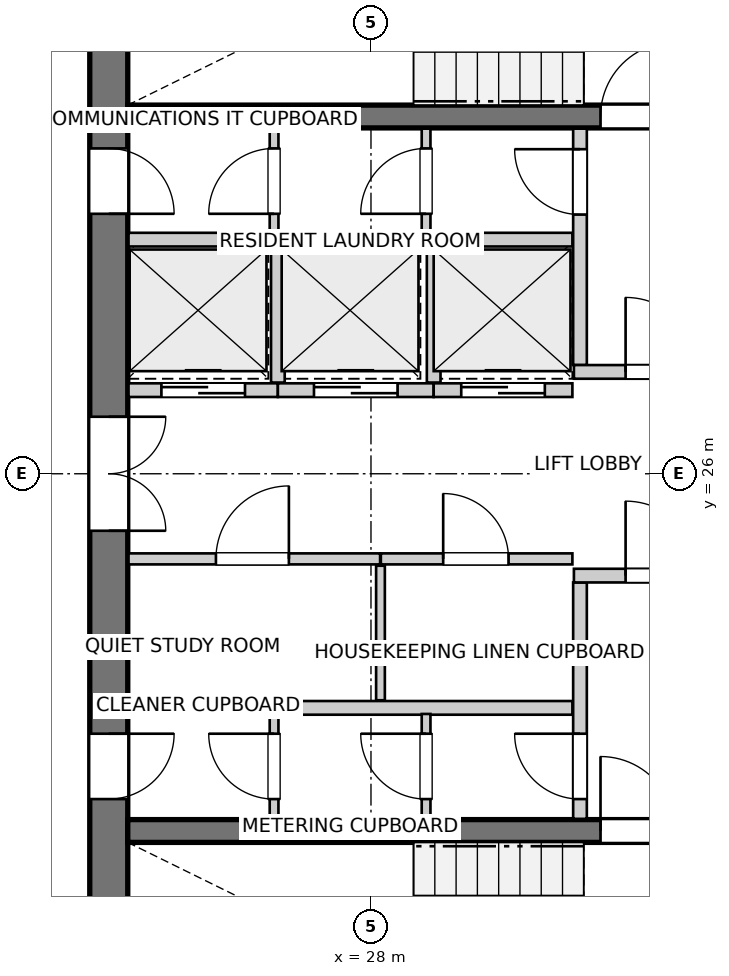
"""IFC4 building model, lengths in metres.
Left out: names, types, materials, properties, quantities, classifications, styles, units other than length and angle.
Written with IfcOpenShell. Run it as: python <this file> out.ifc"""

import sys

from ifc_helpers import new_model, si_unit, direction, frame, frame_2d, origin, place, context, subcontext, project, spatial, rectangle, extrude, source, transform, mapped, element, fill, save


model = new_model("IFC4")
c1 = context("Model", 3, precision=1e-05, world=origin(), true_north=direction((0.0, 1.0)))
c2 = subcontext(c1, "Body", "Model", "MODEL_VIEW")
j1 = project(units=[si_unit("LENGTHUNIT", "METRE"), si_unit("PLANEANGLEUNIT", "RADIAN")], contexts=[c1])
p1 = place(None, origin())
s1 = spatial("IfcSite", under=j1, at=p1, CompositionType="ELEMENT")
p2 = place(p1, origin())
s2 = spatial("IfcBuilding", under=s1, at=p2, CompositionType="ELEMENT")
p3 = place(p2, frame((0.0, 0.0, 250.0)))
s3 = spatial("IfcBuildingStorey", under=s2, at=p3, CompositionType="ELEMENT", Elevation=250.0)
p4 = place(p3, frame((24.55, 33.8, 0.0), z_axis=(0.0, 0.0, 1.0), x_axis=(0.0, -1.0, 0.0)))
e1 = element("IfcWall", 1, at=p4, inside=s3, PredefinedType="SHEAR", context=c2, shape_type="SweptSolid", body=[
    extrude(rectangle(XDim=15.6, YDim=0.5, at=frame_2d((7.8, 0.0))), origin(), (0.0, 0.0, 1.0), 2.95),
])
p5 = place(p4, frame((7.05, 0.0, 0.0)))
e2 = element("IfcOpeningElement", 2, at=p5, cuts=e1, PredefinedType="OPENING", context=c2, shape_type="SweptSolid", body=[
    extrude(rectangle(XDim=1.5, YDim=2.15, at=frame_2d((0.75, 1.075))), frame((0.0, 0.26, 0.0), z_axis=(0.0, -1.0, 0.0), x_axis=(1.0, 0.0, 0.0)), (0.0, 0.0, 1.0), 0.52),
])
p6 = place(p4, frame((3.52, 0.0, 0.0)))
e3 = element("IfcOpeningElement", 3, at=p6, cuts=e1, PredefinedType="OPENING", context=c2, shape_type="SweptSolid", body=[
    extrude(rectangle(XDim=0.86, YDim=2.05, at=frame_2d((0.43, 1.025))), frame((0.0, 0.26, 0.0), z_axis=(0.0, -1.0, 0.0), x_axis=(1.0, 0.0, 0.0)), (0.0, 0.0, 1.0), 0.52),
])
p7 = place(p4, frame((11.22, 0.0, 0.0)))
e4 = element("IfcOpeningElement", 4, at=p7, cuts=e1, PredefinedType="OPENING", context=c2, shape_type="SweptSolid", body=[
    extrude(rectangle(XDim=0.86, YDim=2.05, at=frame_2d((0.43, 1.025))), frame((0.0, 0.26, 0.0), z_axis=(0.0, -1.0, 0.0), x_axis=(1.0, 0.0, 0.0)), (0.0, 0.0, 1.0), 0.52),
])
p8 = place(p3, frame((24.8, 21.3, 0.0), z_axis=(0.0, 0.0, 1.0), x_axis=(1.0, 0.0, 0.0)))
e5 = element("IfcWall", 5, at=p8, inside=s3, PredefinedType="SHEAR", context=c2, shape_type="SweptSolid", body=[
    extrude(rectangle(XDim=11.1, YDim=0.3, at=frame_2d((5.55, 0.0))), origin(), (0.0, 0.0, 1.0), 2.95),
])
p9 = place(p8, frame((6.22, 0.0, 0.0)))
e6 = element("IfcOpeningElement", 6, at=p9, cuts=e5, PredefinedType="OPENING", context=c2, shape_type="SweptSolid", body=[
    extrude(rectangle(XDim=0.98, YDim=2.15, at=frame_2d((0.49, 1.075))), frame((0.0, 0.16, 0.0), z_axis=(0.0, -1.0, 0.0), x_axis=(1.0, 0.0, 0.0)), (0.0, 0.0, 1.0), 0.32),
])
p10 = place(p8, frame((9.15, 0.0, 0.0)))
e7 = element("IfcOpeningElement", 7, at=p10, cuts=e5, PredefinedType="OPENING", context=c2, shape_type="SweptSolid", body=[
    extrude(rectangle(XDim=1.15, YDim=2.15, at=frame_2d((0.575, 1.075))), frame((0.0, 0.16, 0.0), z_axis=(0.0, -1.0, 0.0), x_axis=(1.0, 0.0, 0.0)), (0.0, 0.0, 1.0), 0.32),
])
p11 = place(p3, frame((24.8, 30.7, 0.0), z_axis=(0.0, 0.0, 1.0), x_axis=(1.0, 0.0, 0.0)))
e8 = element("IfcWall", 8, at=p11, inside=s3, PredefinedType="SHEAR", context=c2, shape_type="SweptSolid", body=[
    extrude(rectangle(XDim=11.1, YDim=0.3, at=frame_2d((5.55, 0.0))), origin(), (0.0, 0.0, 1.0), 2.95),
])
p12 = place(p11, frame((6.22, 0.0, 0.0)))
e9 = element("IfcOpeningElement", 9, at=p12, cuts=e8, PredefinedType="OPENING", context=c2, shape_type="SweptSolid", body=[
    extrude(rectangle(XDim=0.98, YDim=2.15, at=frame_2d((0.49, 1.075))), frame((0.0, 0.16, 0.0), z_axis=(0.0, -1.0, 0.0), x_axis=(1.0, 0.0, 0.0)), (0.0, 0.0, 1.0), 0.32),
])
p13 = place(p11, frame((9.15, 0.0, 0.0)))
e10 = element("IfcOpeningElement", 10, at=p13, cuts=e8, PredefinedType="OPENING", context=c2, shape_type="SweptSolid", body=[
    extrude(rectangle(XDim=1.15, YDim=2.15, at=frame_2d((0.575, 1.075))), frame((0.0, 0.16, 0.0), z_axis=(0.0, -1.0, 0.0), x_axis=(1.0, 0.0, 0.0)), (0.0, 0.0, 1.0), 0.32),
])
p14 = place(p3, frame((30.75, 21.46, 0.0), z_axis=(0.0, 0.0, 1.0), x_axis=(0.0, 1.0, 0.0)))
e11 = element("IfcWall", 11, at=p14, inside=s3, PredefinedType="PARTITIONING", context=c2, shape_type="SweptSolid", body=[
    extrude(rectangle(XDim=3.11, YDim=0.18, at=frame_2d((1.555, 0.0))), origin(), (0.0, 0.0, 1.0), 2.95),
])
p15 = place(p14, frame((0.26, 0.0, 0.0)))
e12 = element("IfcOpeningElement", 12, at=p15, cuts=e11, PredefinedType="OPENING", context=c2, shape_type="SweptSolid", body=[
    extrude(rectangle(XDim=0.86, YDim=2.05, at=frame_2d((0.43, 1.025))), frame((0.0, 0.1, 0.0), z_axis=(0.0, -1.0, 0.0), x_axis=(1.0, 0.0, 0.0)), (0.0, 0.0, 1.0), 0.2),
])
p16 = place(p3, frame((30.67, 24.66, 0.0), z_axis=(0.0, 0.0, 1.0), x_axis=(1.0, 0.0, 0.0)))
e13 = element("IfcWall", 13, at=p16, inside=s3, PredefinedType="PARTITIONING", context=c2, shape_type="SweptSolid", body=[
    extrude(rectangle(XDim=5.22, YDim=0.18, at=frame_2d((2.61, 0.0))), origin(), (0.0, 0.0, 1.0), 2.95),
])
p17 = place(p16, frame((0.68, 0.0, 0.0)))
e14 = element("IfcOpeningElement", 14, at=p17, cuts=e13, PredefinedType="OPENING", context=c2, shape_type="SweptSolid", body=[
    extrude(rectangle(XDim=0.98, YDim=2.15, at=frame_2d((0.49, 1.075))), frame((0.0, 0.1, 0.0), z_axis=(0.0, -1.0, 0.0), x_axis=(1.0, 0.0, 0.0)), (0.0, 0.0, 1.0), 0.2),
])
p18 = place(p3, frame((30.75, 27.43, 0.0), z_axis=(0.0, 0.0, 1.0), x_axis=(0.0, 1.0, 0.0)))
e15 = element("IfcWall", 15, at=p18, inside=s3, PredefinedType="PARTITIONING", context=c2, shape_type="SweptSolid", body=[
    extrude(rectangle(XDim=3.11, YDim=0.18, at=frame_2d((1.555, 0.0))), origin(), (0.0, 0.0, 1.0), 2.95),
])
p19 = place(p18, frame((1.98, 0.0, 0.0)))
e16 = element("IfcOpeningElement", 16, at=p19, cuts=e15, PredefinedType="OPENING", context=c2, shape_type="SweptSolid", body=[
    extrude(rectangle(XDim=0.86, YDim=2.05, at=frame_2d((0.43, 1.025))), frame((0.0, 0.1, 0.0), z_axis=(0.0, -1.0, 0.0), x_axis=(1.0, 0.0, 0.0)), (0.0, 0.0, 1.0), 0.2),
])
p20 = place(p3, frame((30.67, 27.34, 0.0), z_axis=(0.0, 0.0, 1.0), x_axis=(1.0, 0.0, 0.0)))
e17 = element("IfcWall", 17, at=p20, inside=s3, PredefinedType="PARTITIONING", context=c2, shape_type="SweptSolid", body=[
    extrude(rectangle(XDim=5.22, YDim=0.18, at=frame_2d((2.61, 0.0))), origin(), (0.0, 0.0, 1.0), 2.95),
])
p21 = place(p20, frame((0.68, 0.0, 0.0)))
e18 = element("IfcOpeningElement", 18, at=p21, cuts=e17, PredefinedType="OPENING", context=c2, shape_type="SweptSolid", body=[
    extrude(rectangle(XDim=0.98, YDim=2.15, at=frame_2d((0.49, 1.075))), frame((0.0, 0.1, 0.0), z_axis=(0.0, -1.0, 0.0), x_axis=(1.0, 0.0, 0.0)), (0.0, 0.0, 1.0), 0.2),
])
p22 = place(p3, frame((24.81, 22.92, 0.0), z_axis=(0.0, 0.0, 1.0), x_axis=(1.0, 0.0, 0.0)))
e19 = element("IfcWall", 19, at=p22, inside=s3, PredefinedType="PARTITIONING", context=c2, shape_type="SweptSolid", body=[
    extrude(rectangle(XDim=5.84, YDim=0.18, at=frame_2d((2.92, 0.0))), origin(), (0.0, 0.0, 1.0), 2.95),
])
p23 = place(p3, frame((24.81, 24.88, 0.0), z_axis=(0.0, 0.0, 1.0), x_axis=(1.0, 0.0, 0.0)))
e20 = element("IfcWall", 20, at=p23, inside=s3, PredefinedType="PARTITIONING", context=c2, shape_type="SweptSolid", body=[
    extrude(rectangle(XDim=3.31, YDim=0.145, at=frame_2d((1.655, 0.0))), origin(), (0.0, 0.0, 1.0), 2.95),
])
p24 = place(p23, frame((1.15, 0.0, 0.0)))
e21 = element("IfcOpeningElement", 21, at=p24, cuts=e20, PredefinedType="OPENING", context=c2, shape_type="SweptSolid", body=[
    extrude(rectangle(XDim=0.96, YDim=2.1, at=frame_2d((0.48, 1.05))), frame((0.0, 0.083, 0.0), z_axis=(0.0, -1.0, 0.0), x_axis=(1.0, 0.0, 0.0)), (0.0, 0.0, 1.0), 0.165),
])
p25 = place(p3, frame((28.13, 24.88, 0.0), z_axis=(0.0, 0.0, 1.0), x_axis=(1.0, 0.0, 0.0)))
e22 = element("IfcWall", 22, at=p25, inside=s3, PredefinedType="PARTITIONING", context=c2, shape_type="SweptSolid", body=[
    extrude(rectangle(XDim=2.52, YDim=0.145, at=frame_2d((1.26, 0.0))), origin(), (0.0, 0.0, 1.0), 2.95),
])
p26 = place(p25, frame((0.82, 0.0, 0.0)))
e23 = element("IfcOpeningElement", 23, at=p26, cuts=e22, PredefinedType="OPENING", context=c2, shape_type="SweptSolid", body=[
    extrude(rectangle(XDim=0.86, YDim=2.05, at=frame_2d((0.43, 1.025))), frame((0.0, 0.083, 0.0), z_axis=(0.0, -1.0, 0.0), x_axis=(1.0, 0.0, 0.0)), (0.0, 0.0, 1.0), 0.165),
])
p27 = place(p3, frame((28.125, 23.02, 0.0), z_axis=(0.0, 0.0, 1.0), x_axis=(0.0, 1.0, 0.0)))
e24 = element("IfcWall", 24, at=p27, inside=s3, PredefinedType="PARTITIONING", context=c2, shape_type="SweptSolid", body=[
    extrude(rectangle(XDim=1.77, YDim=0.115, at=frame_2d((0.885, 0.0))), origin(), (0.0, 0.0, 1.0), 2.95),
])
p28 = place(p3, frame((24.81, 29.08, 0.0), z_axis=(0.0, 0.0, 1.0), x_axis=(1.0, 0.0, 0.0)))
e25 = element("IfcWall", 25, at=p28, inside=s3, PredefinedType="PARTITIONING", context=c2, shape_type="SweptSolid", body=[
    extrude(rectangle(XDim=5.84, YDim=0.18, at=frame_2d((2.92, 0.0))), origin(), (0.0, 0.0, 1.0), 2.95),
])
p29 = place(p3, frame((24.81, 27.1, 0.0), z_axis=(0.0, 0.0, 1.0), x_axis=(1.0, 0.0, 0.0)))
e26 = element("IfcWall", 26, at=p29, inside=s3, PredefinedType="PARTITIONING", context=c2, shape_type="SweptSolid", body=[
    extrude(rectangle(XDim=1.965, YDim=0.18, at=frame_2d((0.982, 0.0))), origin(), (0.0, 0.0, 1.0), 2.95),
])
p30 = place(p29, frame((0.433, 0.0, 0.0)))
e27 = element("IfcOpeningElement", 27, at=p30, cuts=e26, PredefinedType="OPENING", context=c2, shape_type="SweptSolid", body=[
    extrude(rectangle(XDim=1.1, YDim=2.15, at=frame_2d((0.55, 1.075))), frame((0.0, 0.1, 0.0), z_axis=(0.0, -1.0, 0.0), x_axis=(1.0, 0.0, 0.0)), (0.0, 0.0, 1.0), 0.2),
])
p31 = place(p3, frame((26.775, 27.1, 0.0), z_axis=(0.0, 0.0, 1.0), x_axis=(1.0, 0.0, 0.0)))
e28 = element("IfcWall", 28, at=p31, inside=s3, PredefinedType="PARTITIONING", context=c2, shape_type="SweptSolid", body=[
    extrude(rectangle(XDim=2.05, YDim=0.18, at=frame_2d((1.025, 0.0))), origin(), (0.0, 0.0, 1.0), 2.95),
])
p32 = place(p31, frame((0.475, 0.0, 0.0)))
e29 = element("IfcOpeningElement", 29, at=p32, cuts=e28, PredefinedType="OPENING", context=c2, shape_type="SweptSolid", body=[
    extrude(rectangle(XDim=1.1, YDim=2.15, at=frame_2d((0.55, 1.075))), frame((0.0, 0.1, 0.0), z_axis=(0.0, -1.0, 0.0), x_axis=(1.0, 0.0, 0.0)), (0.0, 0.0, 1.0), 0.2),
])
p33 = place(p3, frame((26.775, 27.2, 0.0), z_axis=(0.0, 0.0, 1.0), x_axis=(0.0, 1.0, 0.0)))
e30 = element("IfcWall", 30, at=p33, inside=s3, PredefinedType="PARTITIONING", context=c2, shape_type="SweptSolid", body=[
    extrude(rectangle(XDim=1.78, YDim=0.18, at=frame_2d((0.89, 0.0))), origin(), (0.0, 0.0, 1.0), 2.95),
])
p34 = place(p3, frame((28.825, 27.1, 0.0), z_axis=(0.0, 0.0, 1.0), x_axis=(1.0, 0.0, 0.0)))
e31 = element("IfcWall", 31, at=p34, inside=s3, PredefinedType="PARTITIONING", context=c2, shape_type="SweptSolid", body=[
    extrude(rectangle(XDim=1.825, YDim=0.18, at=frame_2d((0.913, 0.0))), origin(), (0.0, 0.0, 1.0), 2.95),
])
p35 = place(p34, frame((0.363, 0.0, 0.0)))
e32 = element("IfcOpeningElement", 32, at=p35, cuts=e31, PredefinedType="OPENING", context=c2, shape_type="SweptSolid", body=[
    extrude(rectangle(XDim=1.1, YDim=2.15, at=frame_2d((0.55, 1.075))), frame((0.0, 0.1, 0.0), z_axis=(0.0, -1.0, 0.0), x_axis=(1.0, 0.0, 0.0)), (0.0, 0.0, 1.0), 0.2),
])
p36 = place(p3, frame((28.825, 27.2, 0.0), z_axis=(0.0, 0.0, 1.0), x_axis=(0.0, 1.0, 0.0)))
e33 = element("IfcWall", 33, at=p36, inside=s3, PredefinedType="PARTITIONING", context=c2, shape_type="SweptSolid", body=[
    extrude(rectangle(XDim=1.78, YDim=0.18, at=frame_2d((0.89, 0.0))), origin(), (0.0, 0.0, 1.0), 2.95),
])
p37 = place(p3, frame((26.725, 21.46, 0.0), z_axis=(0.0, 0.0, 1.0), x_axis=(0.0, 1.0, 0.0)))
e34 = element("IfcWall", 34, at=p37, inside=s3, PredefinedType="PARTITIONING", context=c2, shape_type="SweptSolid", body=[
    extrude(rectangle(XDim=1.38, YDim=0.115, at=frame_2d((0.69, 0.0))), origin(), (0.0, 0.0, 1.0), 2.95),
])
p38 = place(p37, frame((0.26, 0.0, 0.0)))
e35 = element("IfcOpeningElement", 35, at=p38, cuts=e34, PredefinedType="OPENING", context=c2, shape_type="SweptSolid", body=[
    extrude(rectangle(XDim=0.86, YDim=2.05, at=frame_2d((0.43, 1.025))), frame((0.0, 0.067, 0.0), z_axis=(0.0, -1.0, 0.0), x_axis=(1.0, 0.0, 0.0)), (0.0, 0.0, 1.0), 0.135),
])
p39 = place(p3, frame((26.725, 29.16, 0.0), z_axis=(0.0, 0.0, 1.0), x_axis=(0.0, 1.0, 0.0)))
e36 = element("IfcWall", 36, at=p39, inside=s3, PredefinedType="PARTITIONING", context=c2, shape_type="SweptSolid", body=[
    extrude(rectangle(XDim=1.38, YDim=0.115, at=frame_2d((0.69, 0.0))), origin(), (0.0, 0.0, 1.0), 2.95),
])
p40 = place(p39, frame((0.26, 0.0, 0.0)))
e37 = element("IfcOpeningElement", 37, at=p40, cuts=e36, PredefinedType="OPENING", context=c2, shape_type="SweptSolid", body=[
    extrude(rectangle(XDim=0.86, YDim=2.05, at=frame_2d((0.43, 1.025))), frame((0.0, 0.067, 0.0), z_axis=(0.0, -1.0, 0.0), x_axis=(1.0, 0.0, 0.0)), (0.0, 0.0, 1.0), 0.135),
])
p41 = place(p3, frame((28.725, 21.46, 0.0), z_axis=(0.0, 0.0, 1.0), x_axis=(0.0, 1.0, 0.0)))
e38 = element("IfcWall", 38, at=p41, inside=s3, PredefinedType="PARTITIONING", context=c2, shape_type="SweptSolid", body=[
    extrude(rectangle(XDim=1.38, YDim=0.115, at=frame_2d((0.69, 0.0))), origin(), (0.0, 0.0, 1.0), 2.95),
])
p42 = place(p41, frame((0.26, 0.0, 0.0)))
e39 = element("IfcOpeningElement", 39, at=p42, cuts=e38, PredefinedType="OPENING", context=c2, shape_type="SweptSolid", body=[
    extrude(rectangle(XDim=0.86, YDim=2.05, at=frame_2d((0.43, 1.025))), frame((0.0, 0.067, 0.0), z_axis=(0.0, -1.0, 0.0), x_axis=(1.0, 0.0, 0.0)), (0.0, 0.0, 1.0), 0.135),
])
p43 = place(p3, frame((28.725, 29.16, 0.0), z_axis=(0.0, 0.0, 1.0), x_axis=(0.0, 1.0, 0.0)))
e40 = element("IfcWall", 40, at=p43, inside=s3, PredefinedType="PARTITIONING", context=c2, shape_type="SweptSolid", body=[
    extrude(rectangle(XDim=1.38, YDim=0.115, at=frame_2d((0.69, 0.0))), origin(), (0.0, 0.0, 1.0), 2.95),
])
p44 = place(p43, frame((0.26, 0.0, 0.0)))
e41 = element("IfcOpeningElement", 41, at=p44, cuts=e40, PredefinedType="OPENING", context=c2, shape_type="SweptSolid", body=[
    extrude(rectangle(XDim=0.86, YDim=2.05, at=frame_2d((0.43, 1.025))), frame((0.0, 0.067, 0.0), z_axis=(0.0, -1.0, 0.0), x_axis=(1.0, 0.0, 0.0)), (0.0, 0.0, 1.0), 0.135),
])
m1 = source(origin(), c2, "Body", "SweptSolid", [
    extrude(rectangle(XDim=0.98, YDim=2.15, at=frame_2d((0.49, 1.075))), frame((0.0, 0.025, 0.0), z_axis=(0.0, -1.0, 0.0), x_axis=(1.0, 0.0, 0.0)), (0.0, 0.0, 1.0), 0.05),
])
p45 = place(p9, origin())
e42 = element("IfcDoor", 42, at=p45, inside=s3, OperationType="SINGLE_SWING_LEFT", PredefinedType="DOOR", context=c2, shape_type="MappedRepresentation", body=[
    mapped(m1, transform((0.0, 0.0, 0.0), x_axis=(1.0, 0.0, 0.0), y_axis=(0.0, 1.0, 0.0), z_axis=(0.0, 0.0, 1.0), scale=1.0)),
])
fill(e6, e42)
p46 = place(p12, origin())
e43 = element("IfcDoor", 43, at=p46, inside=s3, OperationType="SINGLE_SWING_RIGHT", PredefinedType="DOOR", context=c2, shape_type="MappedRepresentation", body=[
    mapped(m1, transform((0.0, 0.0, 0.0), x_axis=(1.0, 0.0, 0.0), y_axis=(0.0, 1.0, 0.0), z_axis=(0.0, 0.0, 1.0), scale=1.0)),
])
fill(e9, e43)
m2 = source(origin(), c2, "Body", "SweptSolid", [
    extrude(rectangle(XDim=1.5, YDim=2.15, at=frame_2d((0.75, 1.075))), frame((0.0, 0.025, 0.0), z_axis=(0.0, -1.0, 0.0), x_axis=(1.0, 0.0, 0.0)), (0.0, 0.0, 1.0), 0.05),
])
p47 = place(p5, origin())
e44 = element("IfcDoor", 44, at=p47, inside=s3, OperationType="DOUBLE_DOOR_SINGLE_SWING", PredefinedType="DOOR", context=c2, shape_type="MappedRepresentation", body=[
    mapped(m2, transform((0.0, 0.0, 0.0), x_axis=(1.0, 0.0, 0.0), y_axis=(0.0, 1.0, 0.0), z_axis=(0.0, 0.0, 1.0), scale=1.0)),
])
fill(e2, e44)
m3 = source(origin(), c2, "Body", "SweptSolid", [
    extrude(rectangle(XDim=0.86, YDim=2.05, at=frame_2d((0.43, 1.025))), frame((0.0, 0.025, 0.0), z_axis=(0.0, -1.0, 0.0), x_axis=(1.0, 0.0, 0.0)), (0.0, 0.0, 1.0), 0.05),
])
p48 = place(p6, origin())
e45 = element("IfcDoor", 45, at=p48, inside=s3, OperationType="SINGLE_SWING_RIGHT", PredefinedType="DOOR", context=c2, shape_type="MappedRepresentation", body=[
    mapped(m3, transform((0.0, 0.0, 0.0), x_axis=(1.0, 0.0, 0.0), y_axis=(0.0, 1.0, 0.0), z_axis=(0.0, 0.0, 1.0), scale=1.0)),
])
fill(e3, e45)
p49 = place(p7, origin())
e46 = element("IfcDoor", 46, at=p49, inside=s3, OperationType="SINGLE_SWING_LEFT", PredefinedType="DOOR", context=c2, shape_type="MappedRepresentation", body=[
    mapped(m3, transform((0.0, 0.0, 0.0), x_axis=(1.0, 0.0, 0.0), y_axis=(0.0, 1.0, 0.0), z_axis=(0.0, 0.0, 1.0), scale=1.0)),
])
fill(e4, e46)
p50 = place(p15, origin())
e47 = element("IfcDoor", 47, at=p50, inside=s3, OperationType="SINGLE_SWING_RIGHT", PredefinedType="DOOR", context=c2, shape_type="MappedRepresentation", body=[
    mapped(m3, transform((0.0, 0.0, 0.0), x_axis=(1.0, 0.0, 0.0), y_axis=(0.0, 1.0, 0.0), z_axis=(0.0, 0.0, 1.0), scale=1.0)),
])
fill(e12, e47)
p51 = place(p17, origin())
e48 = element("IfcDoor", 48, at=p51, inside=s3, OperationType="SINGLE_SWING_LEFT", PredefinedType="DOOR", context=c2, shape_type="MappedRepresentation", body=[
    mapped(m1, transform((0.0, 0.0, 0.0), x_axis=(1.0, 0.0, 0.0), y_axis=(0.0, 1.0, 0.0), z_axis=(0.0, 0.0, 1.0), scale=1.0)),
])
fill(e14, e48)
p52 = place(p19, origin())
e49 = element("IfcDoor", 49, at=p52, inside=s3, OperationType="SINGLE_SWING_RIGHT", PredefinedType="DOOR", context=c2, shape_type="MappedRepresentation", body=[
    mapped(m3, transform((0.0, 0.0, 0.0), x_axis=(1.0, 0.0, 0.0), y_axis=(0.0, 1.0, 0.0), z_axis=(0.0, 0.0, 1.0), scale=1.0)),
])
fill(e16, e49)
p53 = place(p21, origin())
e50 = element("IfcDoor", 50, at=p53, inside=s3, OperationType="SINGLE_SWING_LEFT", PredefinedType="DOOR", context=c2, shape_type="MappedRepresentation", body=[
    mapped(m1, transform((0.0, 0.0, 0.0), x_axis=(1.0, 0.0, 0.0), y_axis=(0.0, 1.0, 0.0), z_axis=(0.0, 0.0, 1.0), scale=1.0)),
])
fill(e18, e50)
m4 = source(origin(), c2, "Body", "SweptSolid", [
    extrude(rectangle(XDim=0.96, YDim=2.1, at=frame_2d((0.48, 1.05))), frame((0.0, 0.025, 0.0), z_axis=(0.0, -1.0, 0.0), x_axis=(1.0, 0.0, 0.0)), (0.0, 0.0, 1.0), 0.05),
])
p54 = place(p24, origin())
e51 = element("IfcDoor", 51, at=p54, inside=s3, OperationType="SINGLE_SWING_RIGHT", PredefinedType="DOOR", context=c2, shape_type="MappedRepresentation", body=[
    mapped(m4, transform((0.0, 0.0, 0.0), x_axis=(1.0, 0.0, 0.0), y_axis=(0.0, 1.0, 0.0), z_axis=(0.0, 0.0, 1.0), scale=1.0)),
])
fill(e21, e51)
p55 = place(p26, origin())
e52 = element("IfcDoor", 52, at=p55, inside=s3, OperationType="SINGLE_SWING_LEFT", PredefinedType="DOOR", context=c2, shape_type="MappedRepresentation", body=[
    mapped(m3, transform((0.0, 0.0, 0.0), x_axis=(1.0, 0.0, 0.0), y_axis=(0.0, 1.0, 0.0), z_axis=(0.0, 0.0, 1.0), scale=1.0)),
])
fill(e23, e52)
m5 = source(origin(), c2, "Body", "SweptSolid", [
    extrude(rectangle(XDim=1.1, YDim=2.15, at=frame_2d((0.55, 1.075))), frame((0.0, 0.025, 0.0), z_axis=(0.0, -1.0, 0.0), x_axis=(1.0, 0.0, 0.0)), (0.0, 0.0, 1.0), 0.05),
])
p56 = place(p30, origin())
e53 = element("IfcDoor", 53, at=p56, inside=s3, OperationType="DOUBLE_DOOR_SLIDING", PredefinedType="DOOR", context=c2, shape_type="MappedRepresentation", body=[
    mapped(m5, transform((0.0, 0.0, 0.0), x_axis=(1.0, 0.0, 0.0), y_axis=(0.0, 1.0, 0.0), z_axis=(0.0, 0.0, 1.0), scale=1.0)),
])
fill(e27, e53)
p57 = place(p32, origin())
e54 = element("IfcDoor", 54, at=p57, inside=s3, OperationType="DOUBLE_DOOR_SLIDING", PredefinedType="DOOR", context=c2, shape_type="MappedRepresentation", body=[
    mapped(m5, transform((0.0, 0.0, 0.0), x_axis=(1.0, 0.0, 0.0), y_axis=(0.0, 1.0, 0.0), z_axis=(0.0, 0.0, 1.0), scale=1.0)),
])
fill(e29, e54)
p58 = place(p35, origin())
e55 = element("IfcDoor", 55, at=p58, inside=s3, OperationType="DOUBLE_DOOR_SLIDING", PredefinedType="DOOR", context=c2, shape_type="MappedRepresentation", body=[
    mapped(m5, transform((0.0, 0.0, 0.0), x_axis=(1.0, 0.0, 0.0), y_axis=(0.0, 1.0, 0.0), z_axis=(0.0, 0.0, 1.0), scale=1.0)),
])
fill(e32, e55)
p59 = place(p38, origin())
e56 = element("IfcDoor", 56, at=p59, inside=s3, OperationType="SINGLE_SWING_RIGHT", PredefinedType="DOOR", context=c2, shape_type="MappedRepresentation", body=[
    mapped(m3, transform((0.0, 0.0, 0.0), x_axis=(1.0, 0.0, 0.0), y_axis=(0.0, 1.0, 0.0), z_axis=(0.0, 0.0, 1.0), scale=1.0)),
])
fill(e35, e56)
p60 = place(p40, origin())
e57 = element("IfcDoor", 57, at=p60, inside=s3, OperationType="SINGLE_SWING_LEFT", PredefinedType="DOOR", context=c2, shape_type="MappedRepresentation", body=[
    mapped(m3, transform((0.0, 0.0, 0.0), x_axis=(1.0, 0.0, 0.0), y_axis=(0.0, 1.0, 0.0), z_axis=(0.0, 0.0, 1.0), scale=1.0)),
])
fill(e37, e57)
p61 = place(p42, origin())
e58 = element("IfcDoor", 58, at=p61, inside=s3, OperationType="SINGLE_SWING_RIGHT", PredefinedType="DOOR", context=c2, shape_type="MappedRepresentation", body=[
    mapped(m3, transform((0.0, 0.0, 0.0), x_axis=(1.0, 0.0, 0.0), y_axis=(0.0, 1.0, 0.0), z_axis=(0.0, 0.0, 1.0), scale=1.0)),
])
fill(e39, e58)
p62 = place(p44, origin())
e59 = element("IfcDoor", 59, at=p62, inside=s3, OperationType="SINGLE_SWING_LEFT", PredefinedType="DOOR", context=c2, shape_type="MappedRepresentation", body=[
    mapped(m3, transform((0.0, 0.0, 0.0), x_axis=(1.0, 0.0, 0.0), y_axis=(0.0, 1.0, 0.0), z_axis=(0.0, 0.0, 1.0), scale=1.0)),
])
fill(e41, e59)
save(model, sys.argv[1])
